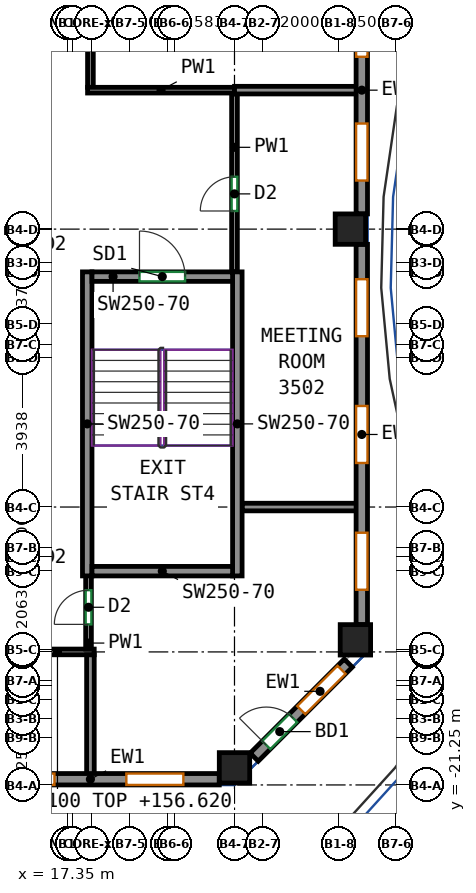
"""IFC4 building model, lengths in metres.
Left out: names, types, materials, properties, quantities, classifications, styles, units other than length and angle.
Written with IfcOpenShell. Run it as: python <this file> out.ifc"""

import sys

from ifc_helpers import new_model, si_unit, direction, frame, frame_2d, origin, origin_2d, place, context, subcontext, project, spatial, rectangle, extrude, source, transform, mapped, element, fill, save


model = new_model("IFC4")
c1 = context("Model", 3, precision=1e-05, world=origin(), true_north=direction((0.0, 1.0)))
c2 = subcontext(c1, "Body", "Model", "MODEL_VIEW")
j1 = project(units=[si_unit("LENGTHUNIT", "METRE"), si_unit("PLANEANGLEUNIT", "RADIAN")], contexts=[c1])
p1 = place(None, origin())
s1 = spatial("IfcSite", under=j1, at=p1, CompositionType="ELEMENT")
p2 = place(p1, origin())
s2 = spatial("IfcBuilding", under=s1, at=p2, CompositionType="ELEMENT")
p3 = place(p2, frame((0.0, 0.0, 154.1)))
s3 = spatial("IfcBuildingStorey", under=s2, at=p3, CompositionType="ELEMENT", Elevation=154.1)
m1 = source(origin(), c2, "Body", "SweptSolid", [
    extrude(rectangle(XDim=0.8, YDim=0.8, at=origin_2d()), origin(), (0.0, 0.0, 1.0), 3.12),
])
for number, where, z_axis, x_axis in (
    (1, (21.75, -20.8, 0.0), (0.0, 0.0, 1.0), (1.0, 0.0, 0.0)),
    (2, (24.8, -6.625, 0.0), (0.0, 0.0, 1.0), (1.0, 0.0, 0.0)),
    (3, (24.932, -17.432, 0.0), (0.0, 0.0, 1.0), (1.0, 0.0, 0.0)),
):
    element("IfcColumn", number, at=place(p3, frame(where, z_axis=z_axis, x_axis=x_axis)), inside=s3, PredefinedType="COLUMN", context=c2, shape_type="MappedRepresentation", body=[
        mapped(m1, transform((0.0, 0.0, 0.0))),
    ])
m2 = source(origin(), c2, "Body", "SweptSolid", [
    extrude(rectangle(XDim=8.0, YDim=0.25, at=frame_2d((4.0, 0.0))), origin(), (0.0, 0.0, 1.0), 3.12),
])
for number, where, z_axis, x_axis in (
    (4, (17.875, -15.75, 0.0), (0.0, 0.0, 1.0), (0.0, 1.0, 0.0)),
    (5, (21.825, -15.75, 0.0), (0.0, 0.0, 1.0), (0.0, 1.0, 0.0)),
):
    element("IfcWall", number, at=place(p3, frame(where, z_axis=z_axis, x_axis=x_axis)), inside=s3, PredefinedType="SHEAR", context=c2, shape_type="MappedRepresentation", body=[
        mapped(m2, transform((0.0, 0.0, 0.0))),
    ])
m3 = source(origin(), c2, "Body", "SweptSolid", [
    extrude(rectangle(XDim=3.7, YDim=0.25, at=frame_2d((1.85, 0.0))), origin(), (0.0, 0.0, 1.0), 3.12),
])
p4 = place(p3, frame((18.0, -15.625, 0.0), z_axis=(0.0, 0.0, 1.0), x_axis=(1.0, 0.0, 0.0)))
e6 = element("IfcWall", 6, at=p4, inside=s3, PredefinedType="SHEAR", context=c2, shape_type="MappedRepresentation", body=[
    mapped(m3, transform((0.0, 0.0, 0.0))),
])
p5 = place(p3, frame((18.0, -7.875, 0.0), z_axis=(0.0, 0.0, 1.0), x_axis=(1.0, 0.0, 0.0)))
e7 = element("IfcWall", 7, at=p5, inside=s3, PredefinedType="SHEAR", context=c2, shape_type="MappedRepresentation", body=[
    mapped(m3, transform((0.0, 0.0, 0.0))),
])
p6 = place(p5, frame((1.25, 0.0, 0.0)))
e8 = element("IfcOpeningElement", 8, at=p6, cuts=e7, PredefinedType="OPENING", context=c2, shape_type="SweptSolid", body=[
    extrude(rectangle(XDim=1.2, YDim=2.1, at=frame_2d((0.6, 1.05))), frame((0.0, 0.135, 0.0), z_axis=(0.0, -1.0, 0.0), x_axis=(1.0, 0.0, 0.0)), (0.0, 0.0, 1.0), 0.27),
])
m4 = source(origin(), c2, "Body", "SweptSolid", [
    extrude(rectangle(XDim=6.783, YDim=0.3, at=frame_2d((3.392, 0.0))), origin(), (0.0, 0.0, 1.0), 3.12),
])
p7 = place(p3, frame((14.567, -21.1, 0.0), z_axis=(0.0, 0.0, 1.0), x_axis=(1.0, 0.0, 0.0)))
e9 = element("IfcWall", 9, at=p7, inside=s3, PredefinedType="SOLIDWALL", context=c2, shape_type="MappedRepresentation", body=[
    mapped(m4, transform((0.0, 0.0, 0.0))),
])
p8 = place(p7, frame((0.946, 0.0, 0.85)))
e10 = element("IfcOpeningElement", 10, at=p8, cuts=e9, PredefinedType="OPENING", context=c2, shape_type="SweptSolid", body=[
    extrude(rectangle(XDim=1.5, YDim=1.95, at=frame_2d((0.75, 0.975))), frame((0.0, 0.16, 0.0), z_axis=(0.0, -1.0, 0.0), x_axis=(1.0, 0.0, 0.0)), (0.0, 0.0, 1.0), 0.32),
])
p9 = place(p7, frame((4.337, 0.0, 0.85)))
e11 = element("IfcOpeningElement", 11, at=p9, cuts=e9, PredefinedType="OPENING", context=c2, shape_type="SweptSolid", body=[
    extrude(rectangle(XDim=1.5, YDim=1.95, at=frame_2d((0.75, 0.975))), frame((0.0, 0.16, 0.0), z_axis=(0.0, -1.0, 0.0), x_axis=(1.0, 0.0, 0.0)), (0.0, 0.0, 1.0), 0.32),
])
m5 = source(origin(), c2, "Body", "SweptSolid", [
    extrude(rectangle(XDim=3.5, YDim=0.3, at=frame_2d((1.75, 0.0))), origin(), (0.0, 0.0, 1.0), 3.12),
])
p10 = place(p3, frame((22.269, -20.519, 0.0), z_axis=(0.0, 0.0, 1.0), x_axis=(0.707141656123, 0.70707190453, 0.0)))
e12 = element("IfcWall", 12, at=p10, inside=s3, PredefinedType="SOLIDWALL", context=c2, shape_type="MappedRepresentation", body=[
    mapped(m5, transform((0.0, 0.0, 0.0))),
])
p11 = place(p10, frame((1.75, 0.0, 0.85)))
e13 = element("IfcOpeningElement", 13, at=p11, cuts=e12, PredefinedType="OPENING", context=c2, shape_type="SweptSolid", body=[
    extrude(rectangle(XDim=1.5, YDim=1.95, at=frame_2d((0.75, 0.975))), frame((0.0, 0.16, 0.0), z_axis=(0.0, -1.0, 0.0), x_axis=(1.0, 0.0, 0.0)), (0.0, 0.0, 1.0), 0.32),
])
p12 = place(p10, frame((0.45, 0.0, 0.0)))
e14 = element("IfcOpeningElement", 14, at=p12, cuts=e12, PredefinedType="OPENING", context=c2, shape_type="SweptSolid", body=[
    extrude(rectangle(XDim=1.0, YDim=2.1, at=frame_2d((0.5, 1.05))), frame((0.0, 0.16, 0.0), z_axis=(0.0, -1.0, 0.0), x_axis=(1.0, 0.0, 0.0)), (0.0, 0.0, 1.0), 0.32),
])
m6 = source(origin(), c2, "Body", "SweptSolid", [
    extrude(rectangle(XDim=10.007, YDim=0.3, at=frame_2d((5.003, 0.0))), origin(), (0.0, 0.0, 1.0), 3.12),
])
p13 = place(p3, frame((25.1, -17.032, 0.0), z_axis=(0.0, 0.0, 1.0), x_axis=(0.0, 1.0, 0.0)))
e15 = element("IfcWall", 15, at=p13, inside=s3, PredefinedType="SOLIDWALL", context=c2, shape_type="MappedRepresentation", body=[
    mapped(m6, transform((0.0, 0.0, 0.0))),
])
p14 = place(p13, frame((0.918, 0.0, 0.85)))
e16 = element("IfcOpeningElement", 16, at=p14, cuts=e15, PredefinedType="OPENING", context=c2, shape_type="SweptSolid", body=[
    extrude(rectangle(XDim=1.5, YDim=1.95, at=frame_2d((0.75, 0.975))), frame((0.0, 0.16, 0.0), z_axis=(0.0, -1.0, 0.0), x_axis=(1.0, 0.0, 0.0)), (0.0, 0.0, 1.0), 0.32),
])
p15 = place(p13, frame((4.253, 0.0, 0.85)))
e17 = element("IfcOpeningElement", 17, at=p15, cuts=e15, PredefinedType="OPENING", context=c2, shape_type="SweptSolid", body=[
    extrude(rectangle(XDim=1.5, YDim=1.95, at=frame_2d((0.75, 0.975))), frame((0.0, 0.16, 0.0), z_axis=(0.0, -1.0, 0.0), x_axis=(1.0, 0.0, 0.0)), (0.0, 0.0, 1.0), 0.32),
])
p16 = place(p13, frame((7.589, 0.0, 0.85)))
e18 = element("IfcOpeningElement", 18, at=p16, cuts=e15, PredefinedType="OPENING", context=c2, shape_type="SweptSolid", body=[
    extrude(rectangle(XDim=1.5, YDim=1.95, at=frame_2d((0.75, 0.975))), frame((0.0, 0.16, 0.0), z_axis=(0.0, -1.0, 0.0), x_axis=(1.0, 0.0, 0.0)), (0.0, 0.0, 1.0), 0.32),
])
m7 = source(origin(), c2, "Body", "SweptSolid", [
    extrude(rectangle(XDim=6.513, YDim=0.3, at=frame_2d((3.256, 0.0))), origin(), (0.0, 0.0, 1.0), 3.12),
])
p17 = place(p3, frame((25.1, -6.225, 0.0), z_axis=(0.0, 0.0, 1.0), x_axis=(0.0, 1.0, 0.0)))
e19 = element("IfcWall", 19, at=p17, inside=s3, PredefinedType="SOLIDWALL", context=c2, shape_type="MappedRepresentation", body=[
    mapped(m7, transform((0.0, 0.0, 0.0))),
])
p18 = place(p17, frame((0.878, 0.0, 0.85)))
e20 = element("IfcOpeningElement", 20, at=p18, cuts=e19, PredefinedType="OPENING", context=c2, shape_type="SweptSolid", body=[
    extrude(rectangle(XDim=1.5, YDim=1.95, at=frame_2d((0.75, 0.975))), frame((0.0, 0.16, 0.0), z_axis=(0.0, -1.0, 0.0), x_axis=(1.0, 0.0, 0.0)), (0.0, 0.0, 1.0), 0.32),
])
p19 = place(p17, frame((4.135, 0.0, 0.85)))
e21 = element("IfcOpeningElement", 21, at=p19, cuts=e19, PredefinedType="OPENING", context=c2, shape_type="SweptSolid", body=[
    extrude(rectangle(XDim=1.5, YDim=1.95, at=frame_2d((0.75, 0.975))), frame((0.0, 0.16, 0.0), z_axis=(0.0, -1.0, 0.0), x_axis=(1.0, 0.0, 0.0)), (0.0, 0.0, 1.0), 0.32),
])
p20 = place(p3, frame((16.125, -17.75, 0.0), z_axis=(0.0, 0.0, 1.0), x_axis=(1.0, 0.0, 0.0)))
e22 = element("IfcWall", 22, at=p20, inside=s3, PredefinedType="PARTITIONING", context=c2, shape_type="SweptSolid", body=[
    extrude(rectangle(XDim=1.934, YDim=0.15, at=frame_2d((0.967, 0.0))), origin(), (0.0, 0.0, 1.0), 2.52),
])
p21 = place(p3, frame((17.909, -17.675, 0.0), z_axis=(0.0, 0.0, 1.0), x_axis=(0.0, 1.0, 0.0)))
e23 = element("IfcWall", 23, at=p21, inside=s3, PredefinedType="PARTITIONING", context=c2, shape_type="SweptSolid", body=[
    extrude(rectangle(XDim=1.975, YDim=0.15, at=frame_2d((0.988, 0.0))), origin(), (0.0, 0.0, 1.0), 3.12),
])
p22 = place(p21, frame((0.65, 0.0, 0.0)))
e24 = element("IfcOpeningElement", 24, at=p22, cuts=e23, PredefinedType="OPENING", context=c2, shape_type="SweptSolid", body=[
    extrude(rectangle(XDim=0.9, YDim=2.1, at=frame_2d((0.45, 1.05))), frame((0.0, 0.085, 0.0), z_axis=(0.0, -1.0, 0.0), x_axis=(1.0, 0.0, 0.0)), (0.0, 0.0, 1.0), 0.17),
])
p23 = place(p3, frame((17.959, -2.894, 0.0), z_axis=(0.0, 0.0, 1.0), x_axis=(0.0, 1.0, 0.0)))
e25 = element("IfcWall", 25, at=p23, inside=s3, PredefinedType="PARTITIONING", context=c2, shape_type="SweptSolid", body=[
    extrude(rectangle(XDim=6.019, YDim=0.15, at=frame_2d((3.01, 0.0))), origin(), (0.0, 0.0, 1.0), 3.12),
])
p24 = place(p23, frame((1.907, 0.0, 0.0)))
e26 = element("IfcOpeningElement", 26, at=p24, cuts=e25, PredefinedType="OPENING", context=c2, shape_type="SweptSolid", body=[
    extrude(rectangle(XDim=0.9, YDim=2.1, at=frame_2d((0.45, 1.05))), frame((0.0, 0.085, 0.0), z_axis=(0.0, -1.0, 0.0), x_axis=(1.0, 0.0, 0.0)), (0.0, 0.0, 1.0), 0.17),
])
p25 = place(p3, frame((21.751, -2.969, 0.0), z_axis=(0.0, 0.0, 1.0), x_axis=(-1.0, 0.0, 0.0)))
e27 = element("IfcWall", 27, at=p25, inside=s3, PredefinedType="PARTITIONING", context=c2, shape_type="SweptSolid", body=[
    extrude(rectangle(XDim=3.867, YDim=0.15, at=frame_2d((1.934, 0.0))), origin(), (0.0, 0.0, 1.0), 3.12),
])
p26 = place(p3, frame((21.75, -7.75, 0.0), z_axis=(0.0, 0.0, 1.0), x_axis=(0.0, 1.0, 0.0)))
e28 = element("IfcWall", 28, at=p26, inside=s3, PredefinedType="PARTITIONING", context=c2, shape_type="SweptSolid", body=[
    extrude(rectangle(XDim=4.682, YDim=0.15, at=frame_2d((2.341, 0.0))), origin(), (0.0, 0.0, 1.0), 3.12),
])
p27 = place(p26, frame((1.602, 0.0, 0.0)))
e29 = element("IfcOpeningElement", 29, at=p27, cuts=e28, PredefinedType="OPENING", context=c2, shape_type="SweptSolid", body=[
    extrude(rectangle(XDim=0.9, YDim=2.1, at=frame_2d((0.45, 1.05))), frame((0.0, 0.085, 0.0), z_axis=(0.0, -1.0, 0.0), x_axis=(1.0, 0.0, 0.0)), (0.0, 0.0, 1.0), 0.17),
])
p28 = place(p3, frame((17.959, -21.0, 0.0), z_axis=(0.0, 0.0, 1.0), x_axis=(0.0, 1.0, 0.0)))
e30 = element("IfcWall", 30, at=p28, inside=s3, PredefinedType="PARTITIONING", context=c2, shape_type="SweptSolid", body=[
    extrude(rectangle(XDim=3.173, YDim=0.2, at=frame_2d((1.586, 0.0))), origin(), (0.0, 0.0, 1.0), 3.12),
])
p29 = place(p3, frame((25.0, -13.938, 0.0), z_axis=(0.0, 0.0, 1.0), x_axis=(-1.0, 0.0, 0.0)))
e31 = element("IfcWall", 31, at=p29, inside=s3, PredefinedType="PARTITIONING", context=c2, shape_type="SweptSolid", body=[
    extrude(rectangle(XDim=3.05, YDim=0.2, at=frame_2d((1.525, 0.0))), origin(), (0.0, 0.0, 1.0), 3.12),
])
p30 = place(p3, frame((21.751, -2.968, 0.0), z_axis=(0.0, 0.0, 1.0), x_axis=(0.999999954829, -0.000300571071, 0.0)))
e32 = element("IfcWall", 32, at=p30, inside=s3, PredefinedType="PARTITIONING", context=c2, shape_type="SweptSolid", body=[
    extrude(rectangle(XDim=3.249, YDim=0.2, at=frame_2d((1.625, 0.0))), origin(), (0.0, 0.0, 1.0), 3.12),
])
p31 = place(p8, origin())
e33 = element("IfcWindow", 33, at=p31, inside=s3, PartitioningType="SINGLE_PANEL", PredefinedType="WINDOW", context=c2, shape_type="SweptSolid", body=[
    extrude(rectangle(XDim=1.5, YDim=1.95, at=frame_2d((0.75, 0.975))), frame((0.0, 0.03, 0.0), z_axis=(0.0, -1.0, 0.0), x_axis=(1.0, 0.0, 0.0)), (0.0, 0.0, 1.0), 0.06),
])
fill(e10, e33)
p32 = place(p9, origin())
e34 = element("IfcWindow", 34, at=p32, inside=s3, PartitioningType="SINGLE_PANEL", PredefinedType="WINDOW", context=c2, shape_type="SweptSolid", body=[
    extrude(rectangle(XDim=1.5, YDim=1.95, at=frame_2d((0.75, 0.975))), frame((0.0, 0.03, 0.0), z_axis=(0.0, -1.0, 0.0), x_axis=(1.0, 0.0, 0.0)), (0.0, 0.0, 1.0), 0.06),
])
fill(e11, e34)
p33 = place(p11, origin())
e35 = element("IfcWindow", 35, at=p33, inside=s3, PartitioningType="SINGLE_PANEL", PredefinedType="WINDOW", context=c2, shape_type="SweptSolid", body=[
    extrude(rectangle(XDim=1.5, YDim=1.95, at=frame_2d((0.75, 0.975))), frame((0.0, 0.03, 0.0), z_axis=(0.0, -1.0, 0.0), x_axis=(1.0, 0.0, 0.0)), (0.0, 0.0, 1.0), 0.06),
])
fill(e13, e35)
p34 = place(p12, origin())
e36 = element("IfcDoor", 36, at=p34, inside=s3, OperationType="SINGLE_SWING_LEFT", PredefinedType="DOOR", context=c2, shape_type="SweptSolid", body=[
    extrude(rectangle(XDim=1.0, YDim=2.1, at=frame_2d((0.5, 1.05))), frame((0.0, 0.025, 0.0), z_axis=(0.0, -1.0, 0.0), x_axis=(1.0, 0.0, 0.0)), (0.0, 0.0, 1.0), 0.05),
])
fill(e14, e36)
p35 = place(p14, origin())
e37 = element("IfcWindow", 37, at=p35, inside=s3, PartitioningType="SINGLE_PANEL", PredefinedType="WINDOW", context=c2, shape_type="SweptSolid", body=[
    extrude(rectangle(XDim=1.5, YDim=1.95, at=frame_2d((0.75, 0.975))), frame((0.0, 0.03, 0.0), z_axis=(0.0, -1.0, 0.0), x_axis=(1.0, 0.0, 0.0)), (0.0, 0.0, 1.0), 0.06),
])
fill(e16, e37)
p36 = place(p15, origin())
e38 = element("IfcWindow", 38, at=p36, inside=s3, PartitioningType="SINGLE_PANEL", PredefinedType="WINDOW", context=c2, shape_type="SweptSolid", body=[
    extrude(rectangle(XDim=1.5, YDim=1.95, at=frame_2d((0.75, 0.975))), frame((0.0, 0.03, 0.0), z_axis=(0.0, -1.0, 0.0), x_axis=(1.0, 0.0, 0.0)), (0.0, 0.0, 1.0), 0.06),
])
fill(e17, e38)
p37 = place(p16, origin())
e39 = element("IfcWindow", 39, at=p37, inside=s3, PartitioningType="SINGLE_PANEL", PredefinedType="WINDOW", context=c2, shape_type="SweptSolid", body=[
    extrude(rectangle(XDim=1.5, YDim=1.95, at=frame_2d((0.75, 0.975))), frame((0.0, 0.03, 0.0), z_axis=(0.0, -1.0, 0.0), x_axis=(1.0, 0.0, 0.0)), (0.0, 0.0, 1.0), 0.06),
])
fill(e18, e39)
p38 = place(p18, origin())
e40 = element("IfcWindow", 40, at=p38, inside=s3, PartitioningType="SINGLE_PANEL", PredefinedType="WINDOW", context=c2, shape_type="SweptSolid", body=[
    extrude(rectangle(XDim=1.5, YDim=1.95, at=frame_2d((0.75, 0.975))), frame((0.0, 0.03, 0.0), z_axis=(0.0, -1.0, 0.0), x_axis=(1.0, 0.0, 0.0)), (0.0, 0.0, 1.0), 0.06),
])
fill(e20, e40)
p39 = place(p19, origin())
e41 = element("IfcWindow", 41, at=p39, inside=s3, PartitioningType="SINGLE_PANEL", PredefinedType="WINDOW", context=c2, shape_type="SweptSolid", body=[
    extrude(rectangle(XDim=1.5, YDim=1.95, at=frame_2d((0.75, 0.975))), frame((0.0, 0.03, 0.0), z_axis=(0.0, -1.0, 0.0), x_axis=(1.0, 0.0, 0.0)), (0.0, 0.0, 1.0), 0.06),
])
fill(e21, e41)
p40 = place(p6, origin())
e42 = element("IfcDoor", 42, at=p40, inside=s3, OperationType="DOUBLE_DOOR_SINGLE_SWING", PredefinedType="DOOR", context=c2, shape_type="SweptSolid", body=[
    extrude(rectangle(XDim=1.2, YDim=2.1, at=frame_2d((0.6, 1.05))), frame((0.0, 0.025, 0.0), z_axis=(0.0, -1.0, 0.0), x_axis=(1.0, 0.0, 0.0)), (0.0, 0.0, 1.0), 0.05),
])
fill(e8, e42)
p41 = place(p22, origin())
e43 = element("IfcDoor", 43, at=p41, inside=s3, OperationType="SINGLE_SWING_LEFT", PredefinedType="DOOR", context=c2, shape_type="SweptSolid", body=[
    extrude(rectangle(XDim=0.9, YDim=2.1, at=frame_2d((0.45, 1.05))), frame((0.0, 0.025, 0.0), z_axis=(0.0, -1.0, 0.0), x_axis=(1.0, 0.0, 0.0)), (0.0, 0.0, 1.0), 0.05),
])
fill(e24, e43)
p42 = place(p27, origin())
e44 = element("IfcDoor", 44, at=p42, inside=s3, OperationType="SINGLE_SWING_LEFT", PredefinedType="DOOR", context=c2, shape_type="SweptSolid", body=[
    extrude(rectangle(XDim=0.9, YDim=2.1, at=frame_2d((0.45, 1.05))), frame((0.0, 0.025, 0.0), z_axis=(0.0, -1.0, 0.0), x_axis=(1.0, 0.0, 0.0)), (0.0, 0.0, 1.0), 0.05),
])
fill(e29, e44)
save(model, sys.argv[1])
